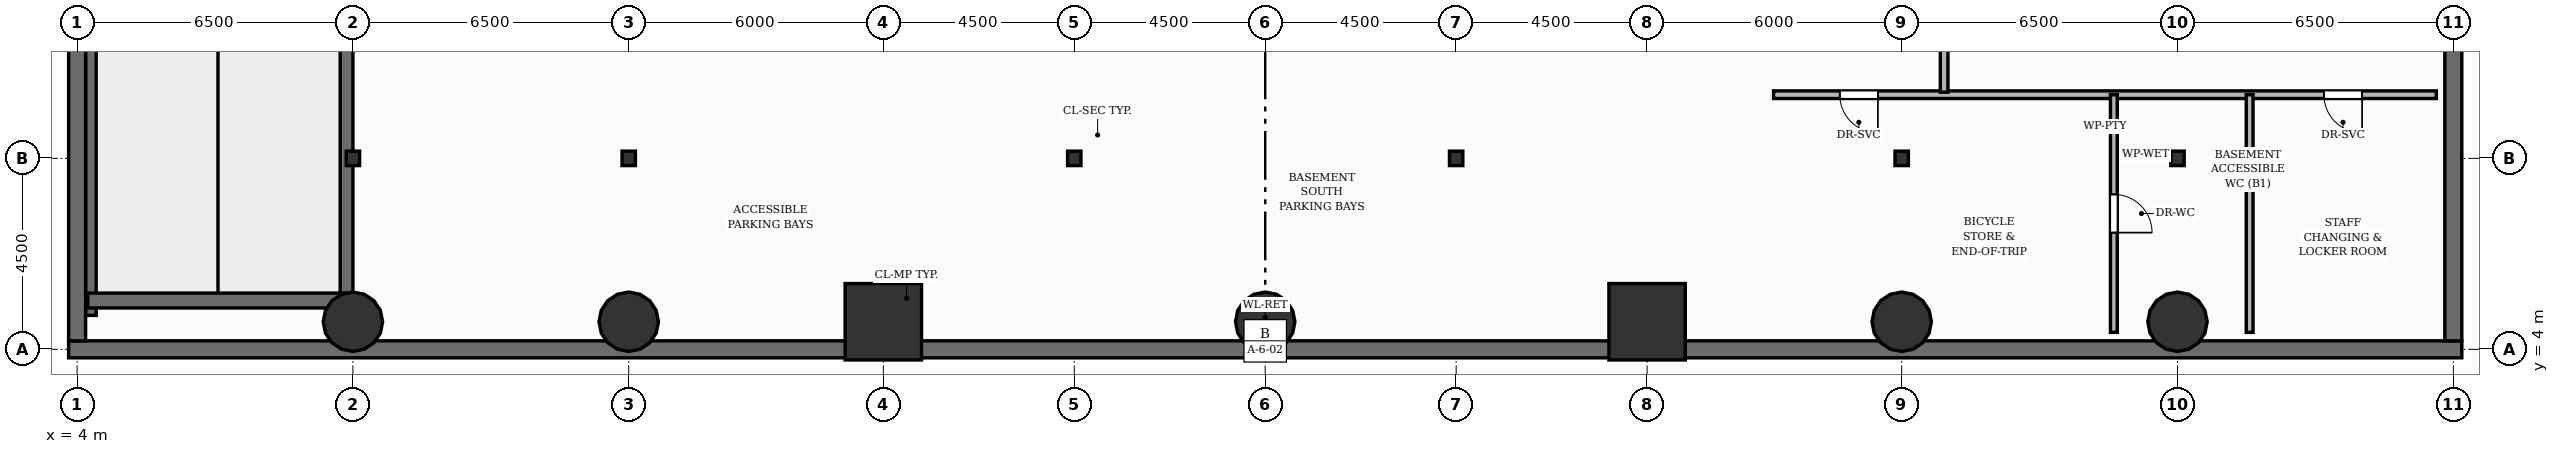
"""IFC4 building model, lengths in metres.
Left out: names, types, materials, properties, quantities, classifications, styles, units other than length and angle.
Written with IfcOpenShell. Run it as: python <this file> out.ifc"""

import sys

from ifc_helpers import new_model, si_unit, direction, frame, frame_2d, origin, origin_2d, place, context, subcontext, project, spatial, rectangle, circle, i_section, extrude, element, fill, save


model = new_model("IFC4")
c1 = context("Model", 3, precision=1e-05, world=origin(), true_north=direction((0.0, 1.0)))
c2 = subcontext(c1, "Body", "Model", "MODEL_VIEW")
j1 = project(units=[si_unit("LENGTHUNIT", "METRE"), si_unit("PLANEANGLEUNIT", "RADIAN")], contexts=[c1])
p1 = place(None, origin())
s1 = spatial("IfcSite", under=j1, at=p1, CompositionType="ELEMENT")
p2 = place(p1, origin())
s2 = spatial("IfcBuilding", under=s1, at=p2, CompositionType="ELEMENT")
p3 = place(p2, frame((0.0, 0.0, -4.5)))
s3 = spatial("IfcBuildingStorey", under=s2, at=p3, CompositionType="ELEMENT", Elevation=-4.5)
p4 = place(p3, frame((4.325, 4.8, 0.0), z_axis=(0.0, 0.0, 1.0), x_axis=(0.0, 1.0, 0.0)))
e1 = element("IfcWall", 1, at=p4, inside=s3, PredefinedType="SHEAR", context=c2, shape_type="SweptSolid", body=[
    extrude(rectangle(XDim=37.9, YDim=0.25, at=frame_2d((18.95, 0.0))), origin(), (0.0, 0.0, 1.0), 4.5),
])
p5 = place(p3, frame((10.35, 4.8, 0.0), z_axis=(0.0, 0.0, 1.0), x_axis=(0.0, 1.0, 0.0)))
e2 = element("IfcWall", 2, at=p5, inside=s3, PredefinedType="SHEAR", context=c2, shape_type="SweptSolid", body=[
    extrude(rectangle(XDim=37.9, YDim=0.3, at=frame_2d((18.95, 0.0))), origin(), (0.0, 0.0, 1.0), 4.5),
])
p6 = place(p3, frame((4.25, 5.15, 0.0), z_axis=(0.0, 0.0, 1.0), x_axis=(1.0, 0.0, 0.0)))
e3 = element("IfcWall", 3, at=p6, inside=s3, PredefinedType="SHEAR", context=c2, shape_type="SweptSolid", body=[
    extrude(rectangle(XDim=6.2, YDim=0.35, at=frame_2d((3.1, 0.0))), origin(), (0.0, 0.0, 1.0), 4.5),
])
p7 = place(p3, frame((3.8, 4.0, 0.0), z_axis=(0.0, 0.0, 1.0), x_axis=(1.0, 0.0, 0.0)))
e4 = element("IfcWall", 4, at=p7, inside=s3, PredefinedType="USERDEFINED", context=c2, shape_type="SweptSolid", body=[
    extrude(rectangle(XDim=56.4, YDim=0.4, at=frame_2d((28.2, 0.0))), origin(), (0.0, 0.0, 1.0), 4.5),
])
for number, where, z_axis, x_axis in (
    (5, (4.0, 4.2, 0.0), (0.0, 0.0, 1.0), (0.0, 1.0, 0.0)),
    (6, (60.0, 4.2, 0.0), (0.0, 0.0, 1.0), (0.0, 1.0, 0.0)),
):
    element("IfcWall", number, at=place(p3, frame(where, z_axis=z_axis, x_axis=x_axis)), inside=s3, PredefinedType="USERDEFINED", context=c2, shape_type="SweptSolid", body=[
        extrude(rectangle(XDim=39.6, YDim=0.4, at=frame_2d((19.8, 0.0))), origin(), (0.0, 0.0, 1.0), 4.5),
    ])
for number, where, z_axis, x_axis in (
    (7, (10.5, 4.65, 0.0), (0.0, 0.0, 1.0), (1.0, 0.0, 0.0)),
    (8, (17.0, 4.65, 0.0), (0.0, 0.0, 1.0), (1.0, 0.0, 0.0)),
    (9, (47.0, 4.65, 0.0), (0.0, 0.0, 1.0), (1.0, 0.0, 0.0)),
    (10, (53.5, 4.65, 0.0), (0.0, 0.0, 1.0), (1.0, 0.0, 0.0)),
):
    element("IfcColumn", number, at=place(p3, frame(where, z_axis=z_axis, x_axis=x_axis)), inside=s3, PredefinedType="COLUMN", context=c2, shape_type="SweptSolid", body=[
        extrude(circle(Radius=0.7, at=origin_2d()), origin(), (0.0, 0.0, 1.0), 4.5),
    ])
p8 = place(p3, frame((23.0, 4.65, 0.0), z_axis=(0.0, 0.0, 1.0), x_axis=(1.0, 0.0, 0.0)))
e11 = element("IfcColumn", 11, at=p8, inside=s3, PredefinedType="COLUMN", context=c2, shape_type="SweptSolid", body=[
    extrude(rectangle(XDim=1.8, YDim=1.8, at=origin_2d()), origin(), (0.0, 0.0, 1.0), 4.5),
])
p9 = place(p3, frame((32.0, 4.65, 0.0), z_axis=(0.0, 0.0, 1.0), x_axis=(1.0, 0.0, 0.0)))
e12 = element("IfcColumn", 12, at=p9, inside=s3, PredefinedType="COLUMN", context=c2, shape_type="SweptSolid", body=[
    extrude(circle(Radius=0.7, at=origin_2d()), origin(), (0.0, 0.0, 1.0), 4.5),
])
p10 = place(p3, frame((41.0, 4.65, 0.0), z_axis=(0.0, 0.0, 1.0), x_axis=(1.0, 0.0, 0.0)))
e13 = element("IfcColumn", 13, at=p10, inside=s3, PredefinedType="COLUMN", context=c2, shape_type="SweptSolid", body=[
    extrude(rectangle(XDim=1.8, YDim=1.8, at=origin_2d()), origin(), (0.0, 0.0, 1.0), 4.5),
])
for number, where, z_axis, x_axis in (
    (14, (27.5, 8.5, 0.0), (0.0, 0.0, 1.0), (1.0, 0.0, 0.0)),
    (15, (36.5, 8.5, 0.0), (0.0, 0.0, 1.0), (1.0, 0.0, 0.0)),
    (16, (10.5, 8.5, 0.0), (0.0, 0.0, 1.0), (1.0, 0.0, 0.0)),
    (17, (17.0, 8.5, 0.0), (0.0, 0.0, 1.0), (1.0, 0.0, 0.0)),
    (18, (47.0, 8.5, 0.0), (0.0, 0.0, 1.0), (1.0, 0.0, 0.0)),
    (19, (53.5, 8.5, 0.0), (0.0, 0.0, 1.0), (1.0, 0.0, 0.0)),
):
    element("IfcColumn", number, at=place(p3, frame(where, z_axis=z_axis, x_axis=x_axis)), inside=s3, PredefinedType="COLUMN", context=c2, shape_type="SweptSolid", body=[
        extrude(i_section(OverallWidth=0.314, OverallDepth=0.34, WebThickness=0.019, FlangeThickness=0.031, at=origin_2d()), origin(), (0.0, 0.0, 1.0), 4.5),
    ])
p11 = place(p3, frame((59.6, 10.0, 0.0), z_axis=(0.0, 0.0, 1.0), x_axis=(-1.0, 0.0, 0.0)))
e20 = element("IfcWall", 20, at=p11, inside=s3, PredefinedType="PARTITIONING", context=c2, shape_type="SweptSolid", body=[
    extrude(rectangle(XDim=15.62, YDim=0.18, at=frame_2d((7.81, 0.0))), origin(), (0.0, 0.0, 1.0), 4.145),
])
p12 = place(p11, frame((13.16, 0.0, 0.0)))
e21 = element("IfcOpeningElement", 21, at=p12, cuts=e20, PredefinedType="OPENING", context=c2, shape_type="SweptSolid", body=[
    extrude(rectangle(XDim=0.9, YDim=2.1, at=frame_2d((0.45, 1.05))), frame((0.0, 0.1, 0.0), z_axis=(0.0, -1.0, 0.0), x_axis=(1.0, 0.0, 0.0)), (0.0, 0.0, 1.0), 0.2),
])
p13 = place(p11, frame((1.75, 0.0, 0.0)))
e22 = element("IfcOpeningElement", 22, at=p13, cuts=e20, PredefinedType="OPENING", context=c2, shape_type="SweptSolid", body=[
    extrude(rectangle(XDim=0.9, YDim=2.1, at=frame_2d((0.45, 1.05))), frame((0.0, 0.1, 0.0), z_axis=(0.0, -1.0, 0.0), x_axis=(1.0, 0.0, 0.0)), (0.0, 0.0, 1.0), 0.2),
])
p14 = place(p3, frame((48.0, 27.42, 0.0), z_axis=(0.0, 0.0, 1.0), x_axis=(0.0, -1.0, 0.0)))
e23 = element("IfcWall", 23, at=p14, inside=s3, PredefinedType="PARTITIONING", context=c2, shape_type="SweptSolid", body=[
    extrude(rectangle(XDim=17.36, YDim=0.18, at=frame_2d((8.68, 0.0))), origin(), (0.0, 0.0, 1.0), 4.145),
])
p15 = place(p14, frame((11.63, 0.0, 0.0)))
e24 = element("IfcOpeningElement", 24, at=p15, cuts=e23, PredefinedType="OPENING", context=c2, shape_type="SweptSolid", body=[
    extrude(rectangle(XDim=0.9, YDim=2.1, at=frame_2d((0.45, 1.05))), frame((0.0, 0.1, 0.0), z_axis=(0.0, -1.0, 0.0), x_axis=(1.0, 0.0, 0.0)), (0.0, 0.0, 1.0), 0.2),
])
p16 = place(p14, frame((2.72, 0.0, 0.0)))
e25 = element("IfcOpeningElement", 25, at=p16, cuts=e23, PredefinedType="OPENING", context=c2, shape_type="SweptSolid", body=[
    extrude(rectangle(XDim=1.4, YDim=2.15, at=frame_2d((0.7, 1.075))), frame((0.0, 0.1, 0.0), z_axis=(0.0, -1.0, 0.0), x_axis=(1.0, 0.0, 0.0)), (0.0, 0.0, 1.0), 0.2),
])
p17 = place(p3, frame((52.0, 10.0, 0.0), z_axis=(0.0, 0.0, 1.0), x_axis=(0.0, -1.0, 0.0)))
e26 = element("IfcWall", 26, at=p17, inside=s3, PredefinedType="PLUMBINGWALL", context=c2, shape_type="SweptSolid", body=[
    extrude(rectangle(XDim=5.6, YDim=0.16, at=frame_2d((2.8, 0.0))), origin(), (0.0, 0.0, 1.0), 4.145),
])
p18 = place(p17, frame((2.35, 0.0, 0.0)))
e27 = element("IfcOpeningElement", 27, at=p18, cuts=e26, PredefinedType="OPENING", context=c2, shape_type="SweptSolid", body=[
    extrude(rectangle(XDim=0.9, YDim=2.1, at=frame_2d((0.45, 1.05))), frame((0.0, 0.09, 0.0), z_axis=(0.0, -1.0, 0.0), x_axis=(1.0, 0.0, 0.0)), (0.0, 0.0, 1.0), 0.18),
])
p19 = place(p3, frame((55.2, 10.0, 0.0), z_axis=(0.0, 0.0, 1.0), x_axis=(0.0, -1.0, 0.0)))
e28 = element("IfcWall", 28, at=p19, inside=s3, PredefinedType="PLUMBINGWALL", context=c2, shape_type="SweptSolid", body=[
    extrude(rectangle(XDim=5.6, YDim=0.16, at=frame_2d((2.8, 0.0))), origin(), (0.0, 0.0, 1.0), 4.145),
])
p20 = place(p12, origin())
e29 = element("IfcDoor", 29, at=p20, inside=s3, OperationType="SINGLE_SWING_LEFT", PredefinedType="DOOR", context=c2, shape_type="SweptSolid", body=[
    extrude(rectangle(XDim=0.9, YDim=2.1, at=frame_2d((0.45, 1.05))), frame((0.0, 0.025, 0.0), z_axis=(0.0, -1.0, 0.0), x_axis=(1.0, 0.0, 0.0)), (0.0, 0.0, 1.0), 0.05),
])
fill(e21, e29)
p21 = place(p18, origin())
e30 = element("IfcDoor", 30, at=p21, inside=s3, OperationType="SINGLE_SWING_RIGHT", PredefinedType="DOOR", context=c2, shape_type="SweptSolid", body=[
    extrude(rectangle(XDim=0.9, YDim=2.1, at=frame_2d((0.45, 1.05))), frame((0.0, 0.025, 0.0), z_axis=(0.0, -1.0, 0.0), x_axis=(1.0, 0.0, 0.0)), (0.0, 0.0, 1.0), 0.05),
])
fill(e27, e30)
p22 = place(p13, origin())
e31 = element("IfcDoor", 31, at=p22, inside=s3, OperationType="SINGLE_SWING_LEFT", PredefinedType="DOOR", context=c2, shape_type="SweptSolid", body=[
    extrude(rectangle(XDim=0.9, YDim=2.1, at=frame_2d((0.45, 1.05))), frame((0.0, 0.025, 0.0), z_axis=(0.0, -1.0, 0.0), x_axis=(1.0, 0.0, 0.0)), (0.0, 0.0, 1.0), 0.05),
])
fill(e22, e31)
save(model, sys.argv[1])
